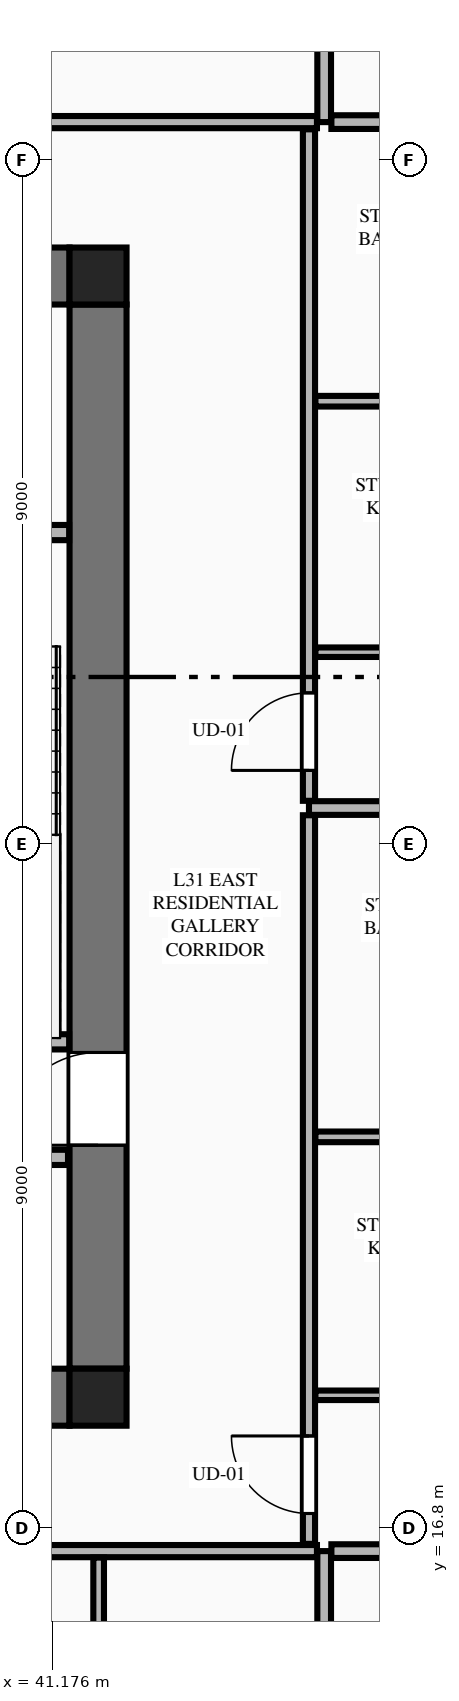
"""IFC4 building model, lengths in metres.
Left out: names, types, materials, properties, quantities, classifications, styles, units other than length and angle.
Written with IfcOpenShell. Run it as: python <this file> out.ifc"""

import sys

from ifc_helpers import new_model, si_unit, direction, frame, frame_2d, origin, origin_2d, place, context, subcontext, project, spatial, rectangle, extrude, element, fill, save


model = new_model("IFC4")
c1 = context("Model", 3, precision=1e-05, world=origin(), true_north=direction((0.0, 1.0)))
c2 = subcontext(c1, "Body", "Model", "MODEL_VIEW")
j1 = project(units=[si_unit("LENGTHUNIT", "METRE"), si_unit("PLANEANGLEUNIT", "RADIAN")], contexts=[c1])
p1 = place(None, origin())
s1 = spatial("IfcSite", under=j1, at=p1, CompositionType="ELEMENT")
p2 = place(p1, origin())
s2 = spatial("IfcBuilding", under=s1, at=p2, CompositionType="ELEMENT")
p3 = place(p2, frame((0.0, 0.0, 119.7)))
s3 = spatial("IfcBuildingStorey", under=s2, at=p3, CompositionType="ELEMENT", Elevation=119.7)
for number, where, z_axis, x_axis in (
    (1, (41.775, 18.525, 0.0), (0.0, 0.0, 1.0), (1.0, 0.0, 0.0)),
    (2, (41.775, 33.275, 0.0), (0.0, 0.0, 1.0), (1.0, 0.0, 0.0)),
):
    element("IfcColumn", number, at=place(p3, frame(where, z_axis=z_axis, x_axis=x_axis)), inside=s3, PredefinedType="COLUMN", context=c2, shape_type="SweptSolid", body=[
        extrude(rectangle(XDim=0.75, YDim=0.75, at=origin_2d()), origin(), (0.0, 0.0, 1.0), 3.55),
    ])
for number, where, z_axis, x_axis in (
    (3, (23.4, 18.525, 0.0), (0.0, 0.0, 1.0), (1.0, 0.0, 0.0)),
    (4, (23.4, 33.275, 0.0), (0.0, 0.0, 1.0), (1.0, 0.0, 0.0)),
):
    element("IfcWall", number, at=place(p3, frame(where, z_axis=z_axis, x_axis=x_axis)), inside=s3, PredefinedType="SHEAR", context=c2, shape_type="SweptSolid", body=[
        extrude(rectangle(XDim=18.0, YDim=0.75, at=frame_2d((9.0, 0.0))), origin(), (0.0, 0.0, 1.0), 3.34),
    ])
p4 = place(p3, frame((41.775, 18.9, 0.0), z_axis=(0.0, 0.0, 1.0), x_axis=(0.0, 1.0, 0.0)))
e5 = element("IfcWall", 5, at=p4, inside=s3, PredefinedType="SHEAR", context=c2, shape_type="SweptSolid", body=[
    extrude(rectangle(XDim=14.0, YDim=0.75, at=frame_2d((7.0, 0.0))), origin(), (0.0, 0.0, 1.0), 3.34),
])
p5 = place(p4, frame((2.94, 0.0, 0.0)))
e6 = element("IfcOpeningElement", 6, at=p5, cuts=e5, PredefinedType="OPENING", context=c2, shape_type="SweptSolid", body=[
    extrude(rectangle(XDim=1.22, YDim=2.25, at=frame_2d((0.61, 1.125))), frame((0.0, 0.385, 0.0), z_axis=(0.0, -1.0, 0.0), x_axis=(1.0, 0.0, 0.0)), (0.0, 0.0, 1.0), 0.77),
])
p6 = place(p3, frame((38.125, 23.2, 0.0), z_axis=(0.0, 0.0, 1.0), x_axis=(1.0, 0.0, 0.0)))
e7 = element("IfcWall", 7, at=p6, inside=s3, PredefinedType="PLUMBINGWALL", context=c2, shape_type="SweptSolid", body=[
    extrude(rectangle(XDim=3.27, YDim=0.2, at=frame_2d((1.635, 0.0))), origin(), (0.0, 0.0, 1.0), 3.34),
])
p7 = place(p3, frame((38.125, 29.9, 0.0), z_axis=(0.0, 0.0, 1.0), x_axis=(1.0, 0.0, 0.0)))
e8 = element("IfcWall", 8, at=p7, inside=s3, PredefinedType="PLUMBINGWALL", context=c2, shape_type="SweptSolid", body=[
    extrude(rectangle(XDim=3.27, YDim=0.2, at=frame_2d((1.635, 0.0))), origin(), (0.0, 0.0, 1.0), 3.34),
])
p8 = place(p7, frame((0.5, 0.0, 0.0)))
e9 = element("IfcOpeningElement", 9, at=p8, cuts=e8, PredefinedType="OPENING", context=c2, shape_type="SweptSolid", body=[
    extrude(rectangle(XDim=0.85, YDim=2.05, at=frame_2d((0.425, 1.025))), frame((0.0, 0.11, 0.0), z_axis=(0.0, -1.0, 0.0), x_axis=(1.0, 0.0, 0.0)), (0.0, 0.0, 1.0), 0.22),
])
p9 = place(p3, frame((23.42, 21.68, 0.0), z_axis=(0.0, 0.0, 1.0), x_axis=(1.0, 0.0, 0.0)))
e10 = element("IfcWall", 10, at=p9, inside=s3, PredefinedType="PLUMBINGWALL", context=c2, shape_type="SweptSolid", body=[
    extrude(rectangle(XDim=17.96, YDim=0.2, at=frame_2d((8.98, 0.0))), origin(), (0.0, 0.0, 1.0), 3.34),
])
p10 = place(p9, frame((11.6, 0.0, 0.0)))
e11 = element("IfcOpeningElement", 11, at=p10, cuts=e10, PredefinedType="OPENING", context=c2, shape_type="SweptSolid", body=[
    extrude(rectangle(XDim=1.1, YDim=2.2, at=frame_2d((0.55, 1.1))), frame((0.0, 0.11, 0.0), z_axis=(0.0, -1.0, 0.0), x_axis=(1.0, 0.0, 0.0)), (0.0, 0.0, 1.0), 0.22),
])
p11 = place(p9, frame((0.41, 0.0, 0.0)))
e12 = element("IfcOpeningElement", 12, at=p11, cuts=e10, PredefinedType="OPENING", context=c2, shape_type="SweptSolid", body=[
    extrude(rectangle(XDim=0.85, YDim=2.05, at=frame_2d((0.425, 1.025))), frame((0.0, 0.11, 0.0), z_axis=(0.0, -1.0, 0.0), x_axis=(1.0, 0.0, 0.0)), (0.0, 0.0, 1.0), 0.22),
])
p12 = place(p9, frame((4.13, 0.0, 0.0)))
e13 = element("IfcOpeningElement", 13, at=p12, cuts=e10, PredefinedType="OPENING", context=c2, shape_type="SweptSolid", body=[
    extrude(rectangle(XDim=0.85, YDim=2.05, at=frame_2d((0.425, 1.025))), frame((0.0, 0.11, 0.0), z_axis=(0.0, -1.0, 0.0), x_axis=(1.0, 0.0, 0.0)), (0.0, 0.0, 1.0), 0.22),
])
p13 = place(p9, frame((7.83, 0.0, 0.0)))
e14 = element("IfcOpeningElement", 14, at=p13, cuts=e10, PredefinedType="OPENING", context=c2, shape_type="SweptSolid", body=[
    extrude(rectangle(XDim=0.85, YDim=2.05, at=frame_2d((0.425, 1.025))), frame((0.0, 0.11, 0.0), z_axis=(0.0, -1.0, 0.0), x_axis=(1.0, 0.0, 0.0)), (0.0, 0.0, 1.0), 0.22),
])
p14 = place(p9, frame((13.78, 0.0, 0.0)))
e15 = element("IfcOpeningElement", 15, at=p14, cuts=e10, PredefinedType="OPENING", context=c2, shape_type="SweptSolid", body=[
    extrude(rectangle(XDim=0.85, YDim=2.05, at=frame_2d((0.425, 1.025))), frame((0.0, 0.11, 0.0), z_axis=(0.0, -1.0, 0.0), x_axis=(1.0, 0.0, 0.0)), (0.0, 0.0, 1.0), 0.22),
])
p15 = place(p9, frame((16.13, 0.0, 0.0)))
e16 = element("IfcOpeningElement", 16, at=p15, cuts=e10, PredefinedType="OPENING", context=c2, shape_type="SweptSolid", body=[
    extrude(rectangle(XDim=0.85, YDim=2.05, at=frame_2d((0.425, 1.025))), frame((0.0, 0.11, 0.0), z_axis=(0.0, -1.0, 0.0), x_axis=(1.0, 0.0, 0.0)), (0.0, 0.0, 1.0), 0.22),
])
p16 = place(p3, frame((44.75, 4.105, 0.0), z_axis=(0.0, 0.0, 1.0), x_axis=(0.0, 1.0, 0.0)))
e17 = element("IfcWall", 17, at=p16, inside=s3, PredefinedType="PARTITIONING", context=c2, shape_type="SweptSolid", body=[
    extrude(rectangle(XDim=12.395, YDim=0.18, at=frame_2d((6.198, 0.0))), origin(), (0.0, 0.0, 1.0), 3.34),
])
p17 = place(p3, frame((20.145, 16.5, 0.0), z_axis=(0.0, 0.0, 1.0), x_axis=(1.0, 0.0, 0.0)))
e18 = element("IfcWall", 18, at=p17, inside=s3, PredefinedType="PARTITIONING", context=c2, shape_type="SweptSolid", body=[
    extrude(rectangle(XDim=24.51, YDim=0.16, at=frame_2d((12.255, 0.0))), origin(), (0.0, 0.0, 1.0), 3.34),
])
p18 = place(p17, frame((0.405, 0.0, 0.0)))
e19 = element("IfcOpeningElement", 19, at=p18, cuts=e18, PredefinedType="OPENING", context=c2, shape_type="SweptSolid", body=[
    extrude(rectangle(XDim=1.35, YDim=2.35, at=frame_2d((0.675, 1.175))), frame((0.0, 0.09, 0.0), z_axis=(0.0, -1.0, 0.0), x_axis=(1.0, 0.0, 0.0)), (0.0, 0.0, 1.0), 0.18),
])
p19 = place(p3, frame((41.783, 10.264, 0.0), z_axis=(0.0, 0.0, 1.0), x_axis=(0.0, 1.0, 0.0)))
e20 = element("IfcWall", 20, at=p19, inside=s3, PredefinedType="PLUMBINGWALL", context=c2, shape_type="SweptSolid", body=[
    extrude(rectangle(XDim=6.151, YDim=0.14, at=frame_2d((3.076, 0.0))), origin(), (0.0, 0.0, 1.0), 2.722),
])
p20 = place(p3, frame((44.75, 35.3, 0.0), z_axis=(0.0, 0.0, 1.0), x_axis=(0.0, 1.0, 0.0)))
e21 = element("IfcWall", 21, at=p20, inside=s3, PredefinedType="PARTITIONING", context=c2, shape_type="SweptSolid", body=[
    extrude(rectangle(XDim=12.195, YDim=0.18, at=frame_2d((6.098, 0.0))), origin(), (0.0, 0.0, 1.0), 3.34),
])
p21 = place(p3, frame((20.145, 35.3, 0.0), z_axis=(0.0, 0.0, 1.0), x_axis=(1.0, 0.0, 0.0)))
e22 = element("IfcWall", 22, at=p21, inside=s3, PredefinedType="PARTITIONING", context=c2, shape_type="SweptSolid", body=[
    extrude(rectangle(XDim=24.51, YDim=0.16, at=frame_2d((12.255, 0.0))), origin(), (0.0, 0.0, 1.0), 3.34),
])
p22 = place(p21, frame((0.405, 0.0, 0.0)))
e23 = element("IfcOpeningElement", 23, at=p22, cuts=e22, PredefinedType="OPENING", context=c2, shape_type="SweptSolid", body=[
    extrude(rectangle(XDim=1.02, YDim=2.25, at=frame_2d((0.51, 1.125))), frame((0.0, 0.09, 0.0), z_axis=(0.0, -1.0, 0.0), x_axis=(1.0, 0.0, 0.0)), (0.0, 0.0, 1.0), 0.18),
])
p23 = place(p3, frame((44.845, 16.5, 0.0), z_axis=(0.0, 0.0, 1.0), x_axis=(1.0, 0.0, 0.0)))
e24 = element("IfcWall", 24, at=p23, inside=s3, PredefinedType="PARTITIONING", context=c2, shape_type="SweptSolid", body=[
    extrude(rectangle(XDim=7.77, YDim=0.18, at=frame_2d((3.885, 0.0))), origin(), (0.0, 0.0, 1.0), 3.34),
])
p24 = place(p3, frame((44.845, 35.3, 0.0), z_axis=(0.0, 0.0, 1.0), x_axis=(1.0, 0.0, 0.0)))
e25 = element("IfcWall", 25, at=p24, inside=s3, PredefinedType="PARTITIONING", context=c2, shape_type="SweptSolid", body=[
    extrude(rectangle(XDim=7.669, YDim=0.18, at=frame_2d((3.834, 0.0))), origin(), (0.0, 0.0, 1.0), 3.34),
])
p25 = place(p3, frame((44.55, 16.595, 0.0), z_axis=(0.0, 0.0, 1.0), x_axis=(0.0, 1.0, 0.0)))
e26 = element("IfcWall", 26, at=p25, inside=s3, PredefinedType="PARTITIONING", context=c2, shape_type="SweptSolid", body=[
    extrude(rectangle(XDim=9.586, YDim=0.16, at=frame_2d((4.793, 0.0))), origin(), (0.0, 0.0, 1.0), 3.34),
])
p26 = place(p25, frame((0.4, 0.0, 0.0)))
e27 = element("IfcOpeningElement", 27, at=p26, cuts=e26, PredefinedType="OPENING", context=c2, shape_type="SweptSolid", body=[
    extrude(rectangle(XDim=1.02, YDim=2.25, at=frame_2d((0.51, 1.125))), frame((0.0, 0.09, 0.0), z_axis=(0.0, -1.0, 0.0), x_axis=(1.0, 0.0, 0.0)), (0.0, 0.0, 1.0), 0.18),
])
p27 = place(p3, frame((44.635, 18.55, 0.0), z_axis=(0.0, 0.0, 1.0), x_axis=(1.0, 0.0, 0.0)))
e28 = element("IfcWall", 28, at=p27, inside=s3, PredefinedType="PARTITIONING", context=c2, shape_type="SweptSolid", body=[
    extrude(rectangle(XDim=2.68, YDim=0.125, at=frame_2d((1.34, 0.0))), origin(), (0.0, 0.0, 1.0), 2.722),
])
p28 = place(p3, frame((44.635, 21.95, 0.0), z_axis=(0.0, 0.0, 1.0), x_axis=(1.0, 0.0, 0.0)))
e29 = element("IfcWall", 29, at=p28, inside=s3, PredefinedType="PLUMBINGWALL", context=c2, shape_type="SweptSolid", body=[
    extrude(rectangle(XDim=2.68, YDim=0.14, at=frame_2d((1.34, 0.0))), origin(), (0.0, 0.0, 1.0), 3.34),
])
p29 = place(p3, frame((44.55, 26.276, 0.0), z_axis=(0.0, 0.0, 1.0), x_axis=(1.0, 0.0, 0.0)))
e30 = element("IfcWall", 30, at=p29, inside=s3, PredefinedType="PARTITIONING", context=c2, shape_type="SweptSolid", body=[
    extrude(rectangle(XDim=12.308, YDim=0.18, at=frame_2d((6.154, 0.0))), origin(), (0.0, 0.0, 1.0), 3.34),
])
p30 = place(p3, frame((44.55, 26.371, 0.0), z_axis=(0.0, 0.0, 1.0), x_axis=(0.0, 1.0, 0.0)))
e31 = element("IfcWall", 31, at=p30, inside=s3, PredefinedType="PARTITIONING", context=c2, shape_type="SweptSolid", body=[
    extrude(rectangle(XDim=8.834, YDim=0.16, at=frame_2d((4.417, 0.0))), origin(), (0.0, 0.0, 1.0), 3.34),
])
p31 = place(p30, frame((0.4, 0.0, 0.0)))
e32 = element("IfcOpeningElement", 32, at=p31, cuts=e31, PredefinedType="OPENING", context=c2, shape_type="SweptSolid", body=[
    extrude(rectangle(XDim=1.02, YDim=2.25, at=frame_2d((0.51, 1.125))), frame((0.0, 0.09, 0.0), z_axis=(0.0, -1.0, 0.0), x_axis=(1.0, 0.0, 0.0)), (0.0, 0.0, 1.0), 0.18),
])
p32 = place(p3, frame((44.635, 28.326, 0.0), z_axis=(0.0, 0.0, 1.0), x_axis=(1.0, 0.0, 0.0)))
e33 = element("IfcWall", 33, at=p32, inside=s3, PredefinedType="PARTITIONING", context=c2, shape_type="SweptSolid", body=[
    extrude(rectangle(XDim=2.68, YDim=0.125, at=frame_2d((1.34, 0.0))), origin(), (0.0, 0.0, 1.0), 3.34),
])
p33 = place(p3, frame((44.635, 31.628, 0.0), z_axis=(0.0, 0.0, 1.0), x_axis=(1.0, 0.0, 0.0)))
e34 = element("IfcWall", 34, at=p33, inside=s3, PredefinedType="PLUMBINGWALL", context=c2, shape_type="SweptSolid", body=[
    extrude(rectangle(XDim=2.68, YDim=0.14, at=frame_2d((1.34, 0.0))), origin(), (0.0, 0.0, 1.0), 3.34),
])
p34 = place(p5, origin())
e35 = element("IfcDoor", 35, at=p34, inside=s3, OperationType="SINGLE_SWING_LEFT", PredefinedType="DOOR", context=c2, shape_type="SweptSolid", body=[
    extrude(rectangle(XDim=1.22, YDim=2.25, at=frame_2d((0.61, 1.125))), frame((0.0, 0.025, 0.0), z_axis=(0.0, -1.0, 0.0), x_axis=(1.0, 0.0, 0.0)), (0.0, 0.0, 1.0), 0.05),
])
fill(e6, e35)
p35 = place(p26, origin())
e36 = element("IfcDoor", 36, at=p35, inside=s3, OperationType="SINGLE_SWING_RIGHT", PredefinedType="DOOR", context=c2, shape_type="SweptSolid", body=[
    extrude(rectangle(XDim=1.02, YDim=2.25, at=frame_2d((0.51, 1.125))), frame((0.0, 0.025, 0.0), z_axis=(0.0, -1.0, 0.0), x_axis=(1.0, 0.0, 0.0)), (0.0, 0.0, 1.0), 0.05),
])
fill(e27, e36)
p36 = place(p31, origin())
e37 = element("IfcDoor", 37, at=p36, inside=s3, OperationType="SINGLE_SWING_LEFT", PredefinedType="DOOR", context=c2, shape_type="SweptSolid", body=[
    extrude(rectangle(XDim=1.02, YDim=2.25, at=frame_2d((0.51, 1.125))), frame((0.0, 0.025, 0.0), z_axis=(0.0, -1.0, 0.0), x_axis=(1.0, 0.0, 0.0)), (0.0, 0.0, 1.0), 0.05),
])
fill(e32, e37)
save(model, sys.argv[1])
